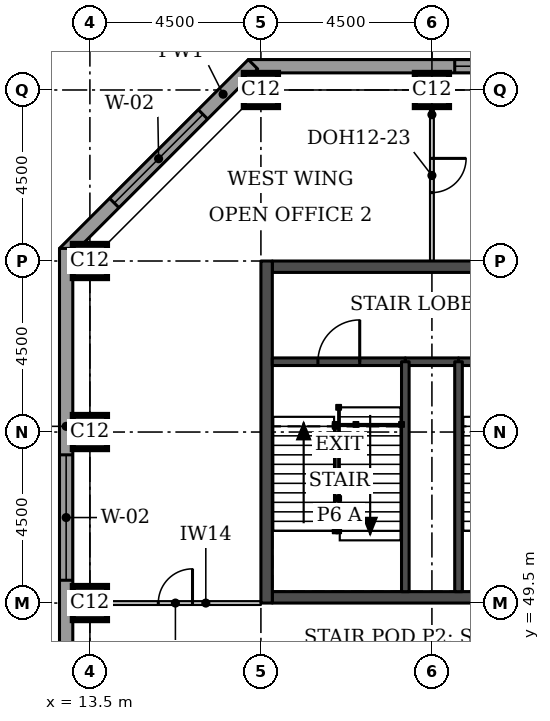
"""IFC4 building model, lengths in metres.
Left out: names, types, materials, properties, quantities, classifications, styles, units other than length and angle.
Written with IfcOpenShell. Run it as: python <this file> out.ifc"""

import sys

from ifc_helpers import new_model, si_unit, direction, frame, frame_2d, origin, origin_2d, place, context, subcontext, project, spatial, rectangle, extrude, element, fill, save


model = new_model("IFC4")
c1 = context("Model", 3, precision=1e-05, world=origin(), true_north=direction((0.0, 1.0)))
c2 = subcontext(c1, "Body", "Model", "MODEL_VIEW")
j1 = project(units=[si_unit("LENGTHUNIT", "METRE"), si_unit("PLANEANGLEUNIT", "RADIAN")], contexts=[c1])
p1 = place(None, origin())
s1 = spatial("IfcSite", under=j1, at=p1, CompositionType="ELEMENT")
p2 = place(p1, origin())
s2 = spatial("IfcBuilding", under=s1, at=p2, CompositionType="ELEMENT")
p3 = place(p2, frame((0.0, 0.0, 245.2)))
s3 = spatial("IfcBuildingStorey", under=s2, at=p3, CompositionType="ELEMENT", Elevation=245.2)
for number, where, z_axis, x_axis in (
    (1, (13.5, 49.5, 0.0), (0.0, 0.0, 1.0), (1.0, 0.0, 0.0)),
    (2, (13.5, 54.0, 0.0), (0.0, 0.0, 1.0), (1.0, 0.0, 0.0)),
    (3, (13.5, 58.5, 0.0), (0.0, 0.0, 1.0), (1.0, 0.0, 0.0)),
    (4, (18.0, 63.0, 0.0), (0.0, 0.0, 1.0), (1.0, 0.0, 0.0)),
    (5, (22.5, 63.0, 0.0), (0.0, 0.0, 1.0), (1.0, 0.0, 0.0)),
):
    element("IfcColumn", number, at=place(p3, frame(where, z_axis=z_axis, x_axis=x_axis)), inside=s3, PredefinedType="COLUMN", context=c2, shape_type="SweptSolid", body=[
        extrude(rectangle(XDim=0.9, YDim=0.9, at=origin_2d()), origin(), (0.0, 0.0, 1.0), 3.7),
    ])
for number, where, z_axis, x_axis in (
    (6, (18.3, 49.65, 0.0), (0.0, 0.0, 1.0), (1.0, 0.0, 0.0)),
    (7, (18.3, 58.35, 0.0), (0.0, 0.0, 1.0), (1.0, 0.0, 0.0)),
):
    element("IfcWall", number, at=place(p3, frame(where, z_axis=z_axis, x_axis=x_axis)), inside=s3, PredefinedType="SHEAR", context=c2, shape_type="SweptSolid", body=[
        extrude(rectangle(XDim=8.4, YDim=0.3, at=frame_2d((4.2, 0.0))), origin(), (0.0, 0.0, 1.0), 3.7),
    ])
p4 = place(p3, frame((18.15, 49.5, 0.0), z_axis=(0.0, 0.0, 1.0), x_axis=(0.0, 1.0, 0.0)))
e8 = element("IfcWall", 8, at=p4, inside=s3, PredefinedType="SHEAR", context=c2, shape_type="SweptSolid", body=[
    extrude(rectangle(XDim=9.0, YDim=0.3, at=frame_2d((4.5, 0.0))), origin(), (0.0, 0.0, 1.0), 3.7),
])
p5 = place(p3, frame((35.55, 63.625, 0.0), z_axis=(0.0, 0.0, 1.0), x_axis=(-1.0, 0.0, 0.0)))
e9 = element("IfcWall", 9, at=p5, inside=s3, PredefinedType="STANDARD", context=c2, shape_type="SweptSolid", body=[
    extrude(rectangle(XDim=17.881, YDim=0.35, at=frame_2d((8.941, 0.0))), origin(), (0.0, 0.0, 1.0), 3.525),
])
p6 = place(p5, frame((0.5, 0.0, 0.9)))
e10 = element("IfcOpeningElement", 10, at=p6, cuts=e9, PredefinedType="OPENING", context=c2, shape_type="SweptSolid", body=[
    extrude(rectangle(XDim=3.3, YDim=1.9, at=frame_2d((1.65, 0.95))), frame((0.0, 0.185, 0.0), z_axis=(0.0, -1.0, 0.0), x_axis=(1.0, 0.0, 0.0)), (0.0, 0.0, 1.0), 0.37),
])
p7 = place(p5, frame((9.15, 0.0, 0.9)))
e11 = element("IfcOpeningElement", 11, at=p7, cuts=e9, PredefinedType="OPENING", context=c2, shape_type="SweptSolid", body=[
    extrude(rectangle(XDim=3.3, YDim=1.9, at=frame_2d((1.65, 0.95))), frame((0.0, 0.185, 0.0), z_axis=(0.0, -1.0, 0.0), x_axis=(1.0, 0.0, 0.0)), (0.0, 0.0, 1.0), 0.37),
])
p8 = place(p3, frame((17.792, 63.676, 0.0), z_axis=(0.0, 0.0, 1.0), x_axis=(-0.707106781187, -0.707106781187, 0.0)))
e12 = element("IfcWall", 12, at=p8, inside=s3, PredefinedType="STANDARD", context=c2, shape_type="SweptSolid", body=[
    extrude(rectangle(XDim=7.027, YDim=0.35, at=frame_2d((3.513, 0.0))), origin(), (0.0, 0.0, 1.0), 3.525),
])
p9 = place(p8, frame((1.863, 0.0, 0.9)))
e13 = element("IfcOpeningElement", 13, at=p9, cuts=e12, PredefinedType="OPENING", context=c2, shape_type="SweptSolid", body=[
    extrude(rectangle(XDim=3.3, YDim=1.9, at=frame_2d((1.65, 0.95))), frame((0.0, 0.185, 0.0), z_axis=(0.0, -1.0, 0.0), x_axis=(1.0, 0.0, 0.0)), (0.0, 0.0, 1.0), 0.37),
])
p10 = place(p3, frame((12.875, 58.831, 0.0), z_axis=(0.0, 0.0, 1.0), x_axis=(0.0, -1.0, 0.0)))
e14 = element("IfcWall", 14, at=p10, inside=s3, PredefinedType="STANDARD", context=c2, shape_type="SweptSolid", body=[
    extrude(rectangle(XDim=14.163, YDim=0.35, at=frame_2d((7.081, 0.0))), origin(), (0.0, 0.0, 1.0), 3.525),
])
p11 = place(p10, frame((5.431, 0.0, 0.9)))
e15 = element("IfcOpeningElement", 15, at=p11, cuts=e14, PredefinedType="OPENING", context=c2, shape_type="SweptSolid", body=[
    extrude(rectangle(XDim=3.3, YDim=1.9, at=frame_2d((1.65, 0.95))), frame((0.0, 0.185, 0.0), z_axis=(0.0, -1.0, 0.0), x_axis=(1.0, 0.0, 0.0)), (0.0, 0.0, 1.0), 0.37),
])
p12 = place(p3, frame((22.5, 63.0, 0.0), z_axis=(0.0, 0.0, 1.0), x_axis=(0.0, -1.0, 0.0)))
e16 = element("IfcWall", 16, at=p12, inside=s3, PredefinedType="PARTITIONING", context=c2, shape_type="SweptSolid", body=[
    extrude(rectangle(XDim=4.5, YDim=0.1, at=frame_2d((2.25, 0.0))), origin(), (0.0, 0.0, 1.0), 3.55),
])
p13 = place(p12, frame((1.8, 0.0, 0.0)))
e17 = element("IfcOpeningElement", 17, at=p13, cuts=e16, PredefinedType="OPENING", context=c2, shape_type="SweptSolid", body=[
    extrude(rectangle(XDim=0.9, YDim=2.1, at=frame_2d((0.45, 1.05))), frame((0.0, 0.06, 0.0), z_axis=(0.0, -1.0, 0.0), x_axis=(1.0, 0.0, 0.0)), (0.0, 0.0, 1.0), 0.12),
])
p14 = place(p3, frame((13.5, 49.5, 0.0), z_axis=(0.0, 0.0, 1.0), x_axis=(1.0, 0.0, 0.0)))
e18 = element("IfcWall", 18, at=p14, inside=s3, PredefinedType="PARTITIONING", context=c2, shape_type="SweptSolid", body=[
    extrude(rectangle(XDim=4.5, YDim=0.1, at=frame_2d((2.25, 0.0))), origin(), (0.0, 0.0, 1.0), 3.55),
])
p15 = place(p14, frame((1.8, 0.0, 0.0)))
e19 = element("IfcOpeningElement", 19, at=p15, cuts=e18, PredefinedType="OPENING", context=c2, shape_type="SweptSolid", body=[
    extrude(rectangle(XDim=0.9, YDim=2.1, at=frame_2d((0.45, 1.05))), frame((0.0, 0.06, 0.0), z_axis=(0.0, -1.0, 0.0), x_axis=(1.0, 0.0, 0.0)), (0.0, 0.0, 1.0), 0.12),
])
p16 = place(p3, frame((21.8, 55.85, 0.0), z_axis=(0.0, 0.0, 1.0), x_axis=(1.0, 0.0, 0.0)))
e20 = element("IfcWall", 20, at=p16, inside=s3, PredefinedType="SOLIDWALL", context=c2, shape_type="SweptSolid", body=[
    extrude(rectangle(XDim=1.4, YDim=0.2, at=frame_2d((0.7, 0.0))), origin(), (0.0, 0.0, 1.0), 3.55),
])
p17 = place(p3, frame((18.3, 55.85, 0.0), z_axis=(0.0, 0.0, 1.0), x_axis=(1.0, 0.0, 0.0)))
e21 = element("IfcWall", 21, at=p17, inside=s3, PredefinedType="SOLIDWALL", context=c2, shape_type="SweptSolid", body=[
    extrude(rectangle(XDim=3.5, YDim=0.2, at=frame_2d((1.75, 0.0))), origin(), (0.0, 0.0, 1.0), 3.55),
])
p18 = place(p17, frame((1.2, 0.0, 0.0)))
e22 = element("IfcOpeningElement", 22, at=p18, cuts=e21, PredefinedType="OPENING", context=c2, shape_type="SweptSolid", body=[
    extrude(rectangle(XDim=1.1, YDim=2.1, at=frame_2d((0.55, 1.05))), frame((0.0, 0.11, 0.0), z_axis=(0.0, -1.0, 0.0), x_axis=(1.0, 0.0, 0.0)), (0.0, 0.0, 1.0), 0.22),
])
p19 = place(p3, frame((23.2, 55.85, 0.0), z_axis=(0.0, 0.0, 1.0), x_axis=(1.0, 0.0, 0.0)))
e23 = element("IfcWall", 23, at=p19, inside=s3, PredefinedType="SOLIDWALL", context=c2, shape_type="SweptSolid", body=[
    extrude(rectangle(XDim=3.5, YDim=0.2, at=frame_2d((1.75, 0.0))), origin(), (0.0, 0.0, 1.0), 3.55),
])
p20 = place(p19, frame((1.2, 0.0, 0.0)))
e24 = element("IfcOpeningElement", 24, at=p20, cuts=e23, PredefinedType="OPENING", context=c2, shape_type="SweptSolid", body=[
    extrude(rectangle(XDim=1.1, YDim=2.1, at=frame_2d((0.55, 1.05))), frame((0.0, 0.11, 0.0), z_axis=(0.0, -1.0, 0.0), x_axis=(1.0, 0.0, 0.0)), (0.0, 0.0, 1.0), 0.22),
])
for number, where, z_axis, x_axis in (
    (25, (21.8, 49.8, 0.0), (0.0, 0.0, 1.0), (0.0, 1.0, 0.0)),
    (26, (23.2, 49.8, 0.0), (0.0, 0.0, 1.0), (0.0, 1.0, 0.0)),
):
    element("IfcWall", number, at=place(p3, frame(where, z_axis=z_axis, x_axis=x_axis)), inside=s3, PredefinedType="SOLIDWALL", context=c2, shape_type="SweptSolid", body=[
        extrude(rectangle(XDim=6.05, YDim=0.2, at=frame_2d((3.025, 0.0))), origin(), (0.0, 0.0, 1.0), 3.55),
    ])
p21 = place(p7, origin())
e27 = element("IfcWindow", 27, at=p21, inside=s3, PartitioningType="SINGLE_PANEL", PredefinedType="WINDOW", context=c2, shape_type="SweptSolid", body=[
    extrude(rectangle(XDim=3.3, YDim=1.9, at=frame_2d((1.65, 0.95))), frame((0.0, 0.085, 0.0), z_axis=(0.0, -1.0, 0.0), x_axis=(1.0, 0.0, 0.0)), (0.0, 0.0, 1.0), 0.06),
])
fill(e11, e27)
p22 = place(p9, origin())
e28 = element("IfcWindow", 28, at=p22, inside=s3, PartitioningType="SINGLE_PANEL", PredefinedType="WINDOW", context=c2, shape_type="SweptSolid", body=[
    extrude(rectangle(XDim=3.3, YDim=1.9, at=frame_2d((1.65, 0.95))), frame((0.0, 0.085, 0.0), z_axis=(0.0, -1.0, 0.0), x_axis=(1.0, 0.0, 0.0)), (0.0, 0.0, 1.0), 0.06),
])
fill(e13, e28)
p23 = place(p11, origin())
e29 = element("IfcWindow", 29, at=p23, inside=s3, PartitioningType="SINGLE_PANEL", PredefinedType="WINDOW", context=c2, shape_type="SweptSolid", body=[
    extrude(rectangle(XDim=3.3, YDim=1.9, at=frame_2d((1.65, 0.95))), frame((0.0, 0.085, 0.0), z_axis=(0.0, -1.0, 0.0), x_axis=(1.0, 0.0, 0.0)), (0.0, 0.0, 1.0), 0.06),
])
fill(e15, e29)
p24 = place(p13, origin())
e30 = element("IfcDoor", 30, at=p24, inside=s3, OperationType="SINGLE_SWING_LEFT", PredefinedType="DOOR", context=c2, shape_type="SweptSolid", body=[
    extrude(rectangle(XDim=0.9, YDim=2.1, at=frame_2d((0.45, 1.05))), frame((0.0, 0.025, 0.0), z_axis=(0.0, -1.0, 0.0), x_axis=(1.0, 0.0, 0.0)), (0.0, 0.0, 1.0), 0.05),
])
fill(e17, e30)
p25 = place(p15, origin())
e31 = element("IfcDoor", 31, at=p25, inside=s3, OperationType="SINGLE_SWING_RIGHT", PredefinedType="DOOR", context=c2, shape_type="SweptSolid", body=[
    extrude(rectangle(XDim=0.9, YDim=2.1, at=frame_2d((0.45, 1.05))), frame((0.0, 0.025, 0.0), z_axis=(0.0, -1.0, 0.0), x_axis=(1.0, 0.0, 0.0)), (0.0, 0.0, 1.0), 0.05),
])
fill(e19, e31)
p26 = place(p18, origin())
e32 = element("IfcDoor", 32, at=p26, inside=s3, OperationType="SINGLE_SWING_RIGHT", PredefinedType="DOOR", context=c2, shape_type="SweptSolid", body=[
    extrude(rectangle(XDim=1.1, YDim=2.1, at=frame_2d((0.55, 1.05))), frame((0.0, 0.025, 0.0), z_axis=(0.0, -1.0, 0.0), x_axis=(1.0, 0.0, 0.0)), (0.0, 0.0, 1.0), 0.05),
])
fill(e22, e32)
save(model, sys.argv[1])
